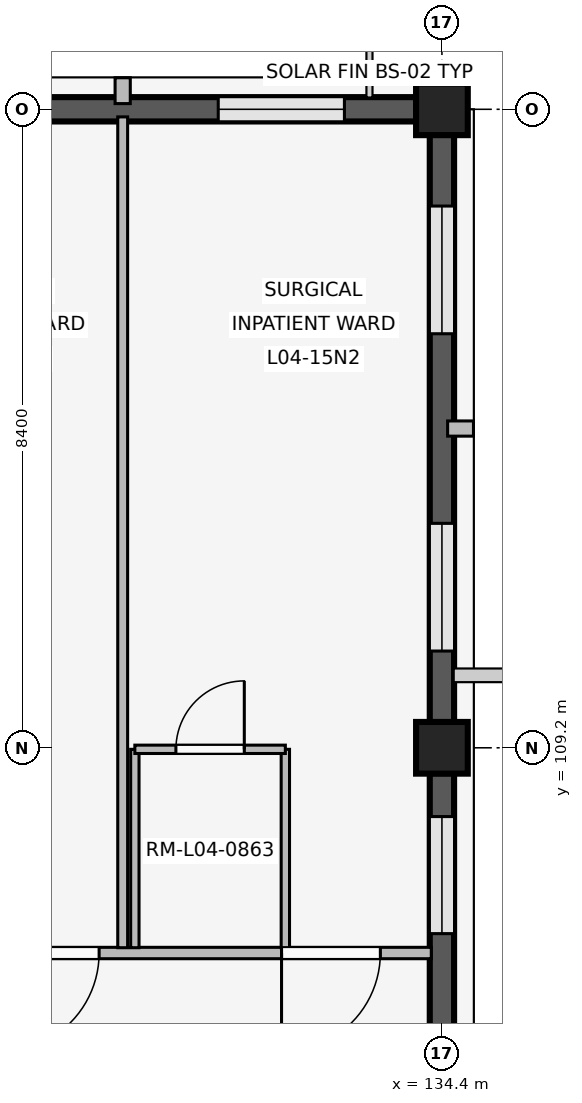
"""IFC4 building model, lengths in metres.
Left out: names, types, materials, properties, quantities, classifications, styles, units other than length and angle.
Written with IfcOpenShell. Run it as: python <this file> out.ifc"""

import sys

from ifc_helpers import new_model, si_unit, direction, frame, frame_2d, origin, origin_2d, place, context, subcontext, project, spatial, rectangle, extrude, element, fill, save


model = new_model("IFC4")
c1 = context("Model", 3, precision=1e-05, world=origin(), true_north=direction((0.0, 1.0)))
c2 = subcontext(c1, "Body", "Model", "MODEL_VIEW")
j1 = project(units=[si_unit("LENGTHUNIT", "METRE"), si_unit("PLANEANGLEUNIT", "RADIAN")], contexts=[c1])
p1 = place(None, origin())
s1 = spatial("IfcSite", under=j1, at=p1, CompositionType="ELEMENT")
p2 = place(p1, origin())
s2 = spatial("IfcBuilding", under=s1, at=p2, CompositionType="ELEMENT")
p3 = place(p2, frame((0.0, 0.0, 16.2)))
s3 = spatial("IfcBuildingStorey", under=s2, at=p3, CompositionType="ELEMENT", Elevation=16.2)
for number, where, z_axis, x_axis in (
    (1, (134.4, 109.2, 0.0), (0.0, 0.0, 1.0), (1.0, 0.0, 0.0)),
    (2, (134.4, 117.6, 0.0), (0.0, 0.0, 1.0), (1.0, 0.0, 0.0)),
):
    element("IfcColumn", number, at=place(p3, frame(where, z_axis=z_axis, x_axis=x_axis)), inside=s3, PredefinedType="COLUMN", context=c2, shape_type="SweptSolid", body=[
        extrude(rectangle(XDim=0.68, YDim=0.68, at=origin_2d()), origin(), (0.0, 0.0, 1.0), 4.2),
    ])
p4 = place(p3, frame((134.4, 108.865, 0.0), z_axis=(0.0, 0.0, 1.0), x_axis=(0.0, -1.0, 0.0)))
e3 = element("IfcWall", 3, at=p4, inside=s3, PredefinedType="SOLIDWALL", context=c2, shape_type="SweptSolid", body=[
    extrude(rectangle(XDim=7.73, YDim=0.32, at=frame_2d((3.865, 0.0))), origin(), (0.0, 0.0, 1.0), 3.32),
])
p5 = place(p4, frame((0.57, 0.0, 0.85)))
e4 = element("IfcOpeningElement", 4, at=p5, cuts=e3, PredefinedType="OPENING", context=c2, shape_type="SweptSolid", body=[
    extrude(rectangle(XDim=1.54, YDim=1.85, at=frame_2d((0.77, 0.925))), frame((0.0, 0.17, 0.0), z_axis=(0.0, -1.0, 0.0), x_axis=(1.0, 0.0, 0.0)), (0.0, 0.0, 1.0), 0.34),
])
p6 = place(p4, frame((5.62, 0.0, 0.85)))
e5 = element("IfcOpeningElement", 5, at=p6, cuts=e3, PredefinedType="OPENING", context=c2, shape_type="SweptSolid", body=[
    extrude(rectangle(XDim=1.54, YDim=1.85, at=frame_2d((0.77, 0.925))), frame((0.0, 0.17, 0.0), z_axis=(0.0, -1.0, 0.0), x_axis=(1.0, 0.0, 0.0)), (0.0, 0.0, 1.0), 0.34),
])
p7 = place(p3, frame((126.335, 117.6, 0.0), z_axis=(0.0, 0.0, 1.0), x_axis=(1.0, 0.0, 0.0)))
e6 = element("IfcWall", 6, at=p7, inside=s3, PredefinedType="SOLIDWALL", context=c2, shape_type="SweptSolid", body=[
    extrude(rectangle(XDim=7.73, YDim=0.32, at=frame_2d((3.865, 0.0))), origin(), (0.0, 0.0, 1.0), 3.32),
])
p8 = place(p7, frame((0.948, 0.0, 0.85)))
e7 = element("IfcOpeningElement", 7, at=p8, cuts=e6, PredefinedType="OPENING", context=c2, shape_type="SweptSolid", body=[
    extrude(rectangle(XDim=1.66, YDim=1.95, at=frame_2d((0.83, 0.975))), frame((0.0, 0.17, 0.0), z_axis=(0.0, -1.0, 0.0), x_axis=(1.0, 0.0, 0.0)), (0.0, 0.0, 1.0), 0.34),
])
p9 = place(p7, frame((5.122, 0.0, 0.85)))
e8 = element("IfcOpeningElement", 8, at=p9, cuts=e6, PredefinedType="OPENING", context=c2, shape_type="SweptSolid", body=[
    extrude(rectangle(XDim=1.66, YDim=1.95, at=frame_2d((0.83, 0.975))), frame((0.0, 0.17, 0.0), z_axis=(0.0, -1.0, 0.0), x_axis=(1.0, 0.0, 0.0)), (0.0, 0.0, 1.0), 0.34),
])
p10 = place(p3, frame((130.2, 117.675, 0.0), z_axis=(0.0, 0.0, 1.0), x_axis=(0.0, 1.0, 0.0)))
e9 = element("IfcWall", 9, at=p10, inside=s3, PredefinedType="ELEMENTEDWALL", context=c2, shape_type="SweptSolid", body=[
    extrude(rectangle(XDim=0.34, YDim=0.2, at=frame_2d((0.17, 0.0))), origin(), (0.0, 0.0, 1.0), 3.3),
])
p11 = place(p3, frame((134.4, 117.265, 0.0), z_axis=(0.0, 0.0, 1.0), x_axis=(0.0, -1.0, 0.0)))
e10 = element("IfcWall", 10, at=p11, inside=s3, PredefinedType="SOLIDWALL", context=c2, shape_type="SweptSolid", body=[
    extrude(rectangle(XDim=7.73, YDim=0.32, at=frame_2d((3.865, 0.0))), origin(), (0.0, 0.0, 1.0), 3.32),
])
p12 = place(p11, frame((0.938, 0.0, 0.85)))
e11 = element("IfcOpeningElement", 11, at=p12, cuts=e10, PredefinedType="OPENING", context=c2, shape_type="SweptSolid", body=[
    extrude(rectangle(XDim=1.68, YDim=2.05, at=frame_2d((0.84, 1.025))), frame((0.0, 0.17, 0.0), z_axis=(0.0, -1.0, 0.0), x_axis=(1.0, 0.0, 0.0)), (0.0, 0.0, 1.0), 0.34),
])
p13 = place(p11, frame((5.112, 0.0, 0.85)))
e12 = element("IfcOpeningElement", 12, at=p13, cuts=e10, PredefinedType="OPENING", context=c2, shape_type="SweptSolid", body=[
    extrude(rectangle(XDim=1.68, YDim=2.05, at=frame_2d((0.84, 1.025))), frame((0.0, 0.17, 0.0), z_axis=(0.0, -1.0, 0.0), x_axis=(1.0, 0.0, 0.0)), (0.0, 0.0, 1.0), 0.34),
])
p14 = place(p3, frame((134.475, 113.4, 0.0), z_axis=(0.0, 0.0, 1.0), x_axis=(1.0, 0.0, 0.0)))
e13 = element("IfcWall", 13, at=p14, inside=s3, PredefinedType="ELEMENTEDWALL", context=c2, shape_type="SweptSolid", body=[
    extrude(rectangle(XDim=0.34, YDim=0.2, at=frame_2d((0.17, 0.0))), origin(), (0.0, 0.0, 1.0), 3.3),
])
p15 = place(p3, frame((134.26, 106.5, 0.0), z_axis=(0.0, 0.0, 1.0), x_axis=(-1.0, 0.0, 0.0)))
e14 = element("IfcWall", 14, at=p15, inside=s3, PredefinedType="PARTITIONING", context=c2, shape_type="SweptSolid", body=[
    extrude(rectangle(XDim=8.18, YDim=0.15, at=frame_2d((4.09, 0.0))), origin(), (0.0, 0.0, 1.0), 3.3),
])
p16 = place(p15, frame((0.67, 0.0, 0.0)))
e15 = element("IfcOpeningElement", 15, at=p16, cuts=e14, PredefinedType="OPENING", context=c2, shape_type="SweptSolid", body=[
    extrude(rectangle(XDim=1.3, YDim=2.25, at=frame_2d((0.65, 1.125))), frame((0.0, 0.085, 0.0), z_axis=(0.0, -1.0, 0.0), x_axis=(1.0, 0.0, 0.0)), (0.0, 0.0, 1.0), 0.17),
])
p17 = place(p15, frame((4.37, 0.0, 0.0)))
e16 = element("IfcOpeningElement", 16, at=p17, cuts=e14, PredefinedType="OPENING", context=c2, shape_type="SweptSolid", body=[
    extrude(rectangle(XDim=1.3, YDim=2.25, at=frame_2d((0.65, 1.125))), frame((0.0, 0.085, 0.0), z_axis=(0.0, -1.0, 0.0), x_axis=(1.0, 0.0, 0.0)), (0.0, 0.0, 1.0), 0.17),
])
p18 = place(p3, frame((130.2, 106.57, 0.0), z_axis=(0.0, 0.0, 1.0), x_axis=(0.0, 1.0, 0.0)))
e17 = element("IfcWall", 17, at=p18, inside=s3, PredefinedType="PARTITIONING", context=c2, shape_type="SweptSolid", body=[
    extrude(rectangle(XDim=10.93, YDim=0.13, at=frame_2d((5.465, 0.0))), origin(), (0.0, 0.0, 1.0), 3.3),
])
for number, where, z_axis, x_axis in (
    (18, (130.36, 106.57, 0.0), (0.0, 0.0, 1.0), (0.0, 1.0, 0.0)),
    (19, (132.34, 106.57, 0.0), (0.0, 0.0, 1.0), (0.0, 1.0, 0.0)),
):
    element("IfcWall", number, at=place(p3, frame(where, z_axis=z_axis, x_axis=x_axis)), inside=s3, PredefinedType="PARTITIONING", context=c2, shape_type="SweptSolid", body=[
        extrude(rectangle(XDim=2.61, YDim=0.11, at=frame_2d((1.305, 0.0))), origin(), (0.0, 0.0, 1.0), 3.3),
    ])
p19 = place(p3, frame((130.36, 109.18, 0.0), z_axis=(0.0, 0.0, 1.0), x_axis=(1.0, 0.0, 0.0)))
e20 = element("IfcWall", 20, at=p19, inside=s3, PredefinedType="PARTITIONING", context=c2, shape_type="SweptSolid", body=[
    extrude(rectangle(XDim=1.98, YDim=0.11, at=frame_2d((0.99, 0.0))), origin(), (0.0, 0.0, 1.0), 3.3),
])
p20 = place(p19, frame((0.54, 0.0, 0.0)))
e21 = element("IfcOpeningElement", 21, at=p20, cuts=e20, PredefinedType="OPENING", context=c2, shape_type="SweptSolid", body=[
    extrude(rectangle(XDim=0.9, YDim=2.1, at=frame_2d((0.45, 1.05))), frame((0.0, 0.065, 0.0), z_axis=(0.0, -1.0, 0.0), x_axis=(1.0, 0.0, 0.0)), (0.0, 0.0, 1.0), 0.13),
])
p21 = place(p5, origin())
e22 = element("IfcWindow", 22, at=p21, inside=s3, PartitioningType="SINGLE_PANEL", PredefinedType="WINDOW", context=c2, shape_type="SweptSolid", body=[
    extrude(rectangle(XDim=1.54, YDim=1.85, at=frame_2d((0.77, 0.925))), frame((0.0, 0.03, 0.0), z_axis=(0.0, -1.0, 0.0), x_axis=(1.0, 0.0, 0.0)), (0.0, 0.0, 1.0), 0.06),
])
fill(e4, e22)
p22 = place(p9, origin())
e23 = element("IfcWindow", 23, at=p22, inside=s3, PartitioningType="SINGLE_PANEL", PredefinedType="WINDOW", context=c2, shape_type="SweptSolid", body=[
    extrude(rectangle(XDim=1.66, YDim=1.95, at=frame_2d((0.83, 0.975))), frame((0.0, 0.03, 0.0), z_axis=(0.0, -1.0, 0.0), x_axis=(1.0, 0.0, 0.0)), (0.0, 0.0, 1.0), 0.06),
])
fill(e8, e23)
p23 = place(p12, origin())
e24 = element("IfcWindow", 24, at=p23, inside=s3, PartitioningType="SINGLE_PANEL", PredefinedType="WINDOW", context=c2, shape_type="SweptSolid", body=[
    extrude(rectangle(XDim=1.68, YDim=2.05, at=frame_2d((0.84, 1.025))), frame((0.0, 0.03, 0.0), z_axis=(0.0, -1.0, 0.0), x_axis=(1.0, 0.0, 0.0)), (0.0, 0.0, 1.0), 0.06),
])
fill(e11, e24)
p24 = place(p13, origin())
e25 = element("IfcWindow", 25, at=p24, inside=s3, PartitioningType="SINGLE_PANEL", PredefinedType="WINDOW", context=c2, shape_type="SweptSolid", body=[
    extrude(rectangle(XDim=1.68, YDim=2.05, at=frame_2d((0.84, 1.025))), frame((0.0, 0.03, 0.0), z_axis=(0.0, -1.0, 0.0), x_axis=(1.0, 0.0, 0.0)), (0.0, 0.0, 1.0), 0.06),
])
fill(e12, e25)
p25 = place(p16, origin())
e26 = element("IfcDoor", 26, at=p25, inside=s3, OperationType="SINGLE_SWING_RIGHT", PredefinedType="DOOR", context=c2, shape_type="SweptSolid", body=[
    extrude(rectangle(XDim=1.3, YDim=2.25, at=frame_2d((0.65, 1.125))), frame((0.0, 0.025, 0.0), z_axis=(0.0, -1.0, 0.0), x_axis=(1.0, 0.0, 0.0)), (0.0, 0.0, 1.0), 0.05),
])
fill(e15, e26)
p26 = place(p17, origin())
e27 = element("IfcDoor", 27, at=p26, inside=s3, OperationType="SINGLE_SWING_RIGHT", PredefinedType="DOOR", context=c2, shape_type="SweptSolid", body=[
    extrude(rectangle(XDim=1.3, YDim=2.25, at=frame_2d((0.65, 1.125))), frame((0.0, 0.025, 0.0), z_axis=(0.0, -1.0, 0.0), x_axis=(1.0, 0.0, 0.0)), (0.0, 0.0, 1.0), 0.05),
])
fill(e16, e27)
p27 = place(p20, origin())
e28 = element("IfcDoor", 28, at=p27, inside=s3, OperationType="SINGLE_SWING_RIGHT", PredefinedType="DOOR", context=c2, shape_type="SweptSolid", body=[
    extrude(rectangle(XDim=0.9, YDim=2.1, at=frame_2d((0.45, 1.05))), frame((0.0, 0.025, 0.0), z_axis=(0.0, -1.0, 0.0), x_axis=(1.0, 0.0, 0.0)), (0.0, 0.0, 1.0), 0.05),
])
fill(e21, e28)
save(model, sys.argv[1])
